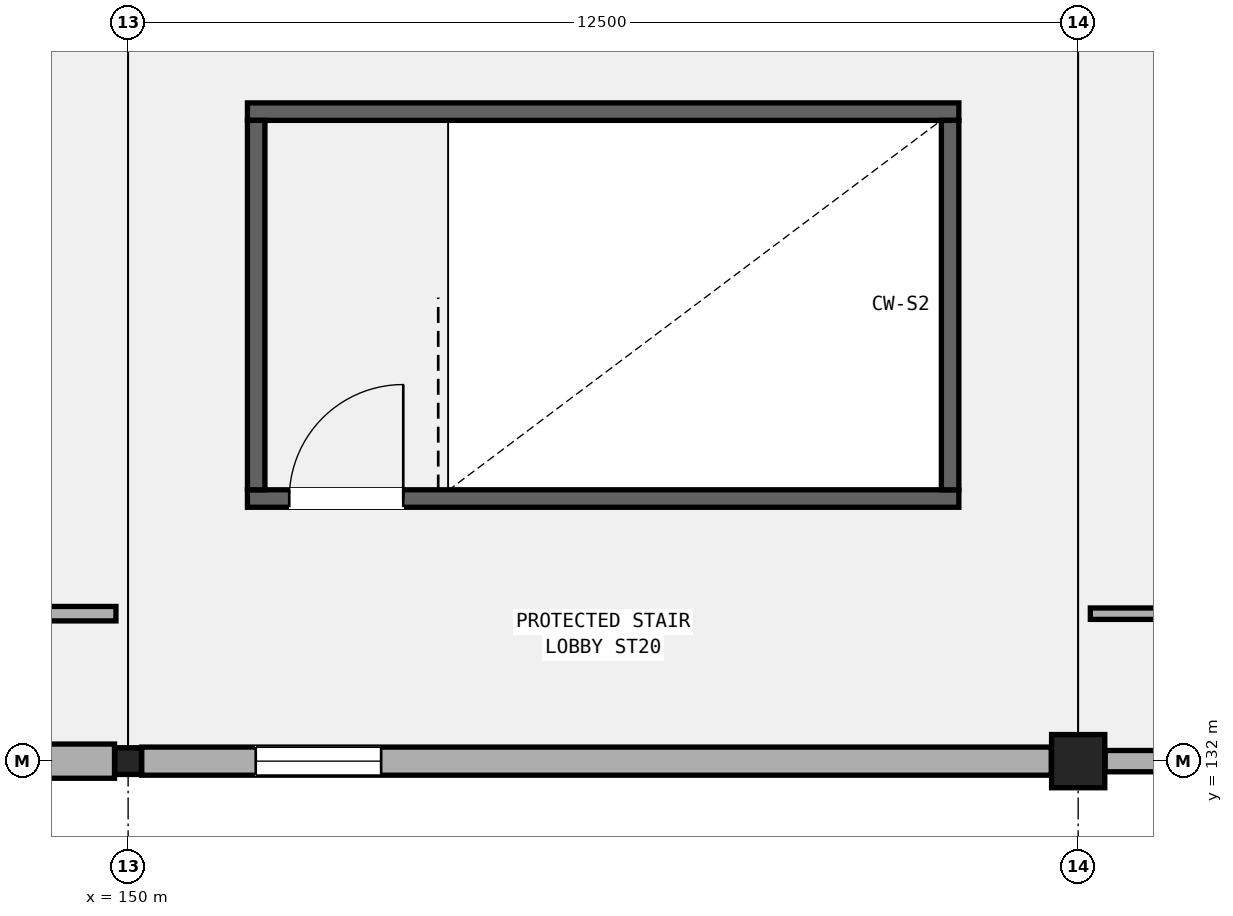
"""IFC4 building model, lengths in metres.
Left out: names, types, materials, properties, quantities, classifications, styles, units other than length and angle.
Written with IfcOpenShell. Run it as: python <this file> out.ifc"""

import sys

from ifc_helpers import new_model, si_unit, direction, frame, frame_2d, origin, origin_2d, place, context, subcontext, project, spatial, rectangle, hollow_rectangle, extrude, element, fill, save


model = new_model("IFC4")
c1 = context("Model", 3, precision=1e-05, world=origin(), true_north=direction((0.0, 1.0)))
c2 = subcontext(c1, "Body", "Model", "MODEL_VIEW")
j1 = project(units=[si_unit("LENGTHUNIT", "METRE"), si_unit("PLANEANGLEUNIT", "RADIAN")], contexts=[c1])
p1 = place(None, origin())
s1 = spatial("IfcSite", under=j1, at=p1, CompositionType="ELEMENT")
p2 = place(p1, origin())
s2 = spatial("IfcBuilding", under=s1, at=p2, CompositionType="ELEMENT")
p3 = place(p2, frame((0.0, 0.0, 20.4)))
s3 = spatial("IfcBuildingStorey", under=s2, at=p3, CompositionType="ELEMENT", Elevation=20.4)
p4 = place(p3, frame((150.0, 132.0, 0.0), z_axis=(0.0, 0.0, 1.0), x_axis=(1.0, 0.0, 0.0)))
e1 = element("IfcColumn", 1, at=p4, inside=s3, PredefinedType="COLUMN", context=c2, shape_type="SweptSolid", body=[
    extrude(hollow_rectangle(XDim=0.35, YDim=0.35, WallThickness=0.016, InnerFilletRadius=0.016, OuterFilletRadius=0.032, at=origin_2d()), origin(), (0.0, 0.0, 1.0), 5.4),
])
p5 = place(p3, frame((162.5, 132.0, 0.0), z_axis=(0.0, 0.0, 1.0), x_axis=(1.0, 0.0, 0.0)))
e2 = element("IfcColumn", 2, at=p5, inside=s3, PredefinedType="COLUMN", context=c2, shape_type="SweptSolid", body=[
    extrude(rectangle(XDim=0.7, YDim=0.7, at=origin_2d()), origin(), (0.0, 0.0, 1.0), 5.4),
])
p6 = place(p3, frame((137.704, 132.0, 0.0), z_axis=(0.0, 0.0, 1.0), x_axis=(1.0, 0.0, 0.0)))
e3 = element("IfcWall", 3, at=p6, inside=s3, PredefinedType="SOLIDWALL", context=c2, shape_type="SweptSolid", body=[
    extrude(rectangle(XDim=12.117, YDim=0.45, at=frame_2d((6.059, 0.0))), origin(), (0.0, 0.0, 1.0), 4.58),
])
p7 = place(p6, frame((1.5, 0.0, 0.95)))
e4 = element("IfcOpeningElement", 4, at=p7, cuts=e3, PredefinedType="OPENING", context=c2, shape_type="SweptSolid", body=[
    extrude(rectangle(XDim=1.5, YDim=2.25, at=frame_2d((0.75, 1.125))), frame((0.0, 0.235, 0.0), z_axis=(0.0, -1.0, 0.0), x_axis=(1.0, 0.0, 0.0)), (0.0, 0.0, 1.0), 0.47),
])
p8 = place(p3, frame((150.179, 132.0, 0.0), z_axis=(0.0, 0.0, 1.0), x_axis=(1.0, 0.0, 0.0)))
e5 = element("IfcWall", 5, at=p8, inside=s3, PredefinedType="SOLIDWALL", context=c2, shape_type="SweptSolid", body=[
    extrude(rectangle(XDim=11.967, YDim=0.37, at=frame_2d((5.983, 0.0))), origin(), (0.0, 0.0, 1.0), 4.592),
])
p9 = place(p8, frame((1.5, 0.0, 0.95)))
e6 = element("IfcOpeningElement", 6, at=p9, cuts=e5, PredefinedType="OPENING", context=c2, shape_type="SweptSolid", body=[
    extrude(rectangle(XDim=1.65, YDim=2.45, at=frame_2d((0.825, 1.225))), frame((0.0, 0.195, 0.0), z_axis=(0.0, -1.0, 0.0), x_axis=(1.0, 0.0, 0.0)), (0.0, 0.0, 1.0), 0.39),
])
p10 = place(p3, frame((162.854, 132.0, 0.0), z_axis=(0.0, 0.0, 1.0), x_axis=(1.0, 0.0, 0.0)))
e7 = element("IfcWall", 7, at=p10, inside=s3, PredefinedType="SOLIDWALL", context=c2, shape_type="SweptSolid", body=[
    extrude(rectangle(XDim=11.842, YDim=0.28, at=frame_2d((5.921, 0.0))), origin(), (0.0, 0.0, 1.0), 4.48),
])
p11 = place(p10, frame((1.5, 0.0, 0.95)))
e8 = element("IfcOpeningElement", 8, at=p11, cuts=e7, PredefinedType="OPENING", context=c2, shape_type="SweptSolid", body=[
    extrude(rectangle(XDim=1.8, YDim=2.55, at=frame_2d((0.9, 1.275))), frame((0.0, 0.15, 0.0), z_axis=(0.0, -1.0, 0.0), x_axis=(1.0, 0.0, 0.0)), (0.0, 0.0, 1.0), 0.3),
])
p12 = place(p3, frame((151.57, 135.455, 0.0), z_axis=(0.0, 0.0, 1.0), x_axis=(1.0, 0.0, 0.0)))
e9 = element("IfcWall", 9, at=p12, inside=s3, PredefinedType="SHEAR", context=c2, shape_type="SweptSolid", body=[
    extrude(rectangle(XDim=9.36, YDim=0.23, at=frame_2d((4.68, 0.0))), origin(), (0.0, 0.0, 1.0), 5.18),
])
p13 = place(p12, frame((0.55, 0.0, 0.0)))
e10 = element("IfcOpeningElement", 10, at=p13, cuts=e9, PredefinedType="OPENING", context=c2, shape_type="SweptSolid", body=[
    extrude(rectangle(XDim=1.5, YDim=2.2, at=frame_2d((0.75, 1.1))), frame((0.0, 0.125, 0.0), z_axis=(0.0, -1.0, 0.0), x_axis=(1.0, 0.0, 0.0)), (0.0, 0.0, 1.0), 0.25),
])
p14 = place(p3, frame((151.57, 140.545, 0.0), z_axis=(0.0, 0.0, 1.0), x_axis=(1.0, 0.0, 0.0)))
e11 = element("IfcWall", 11, at=p14, inside=s3, PredefinedType="SHEAR", context=c2, shape_type="SweptSolid", body=[
    extrude(rectangle(XDim=9.36, YDim=0.23, at=frame_2d((4.68, 0.0))), origin(), (0.0, 0.0, 1.0), 5.18),
])
for number, where, z_axis, x_axis in (
    (12, (151.685, 135.57, 0.0), (0.0, 0.0, 1.0), (0.0, 1.0, 0.0)),
    (13, (160.815, 135.57, 0.0), (0.0, 0.0, 1.0), (0.0, 1.0, 0.0)),
):
    element("IfcWall", number, at=place(p3, frame(where, z_axis=z_axis, x_axis=x_axis)), inside=s3, PredefinedType="SHEAR", context=c2, shape_type="SweptSolid", body=[
        extrude(rectangle(XDim=4.86, YDim=0.23, at=frame_2d((2.43, 0.0))), origin(), (0.0, 0.0, 1.0), 5.18),
    ])
p15 = place(p3, frame((137.66, 133.94, 0.0), z_axis=(0.0, 0.0, 1.0), x_axis=(1.0, 0.0, 0.0)))
e14 = element("IfcWall", 14, at=p15, inside=s3, PredefinedType="PARTITIONING", context=c2, shape_type="SweptSolid", body=[
    extrude(rectangle(XDim=12.18, YDim=0.19, at=frame_2d((6.09, 0.0))), origin(), (0.0, 0.0, 1.0), 4.52),
])
p16 = place(p15, frame((2.461, 0.0, 0.0)))
e15 = element("IfcOpeningElement", 15, at=p16, cuts=e14, PredefinedType="OPENING", context=c2, shape_type="SweptSolid", body=[
    extrude(rectangle(XDim=1.21, YDim=2.18, at=frame_2d((0.605, 1.09))), frame((0.0, 0.105, 0.0), z_axis=(0.0, -1.0, 0.0), x_axis=(1.0, 0.0, 0.0)), (0.0, 0.0, 1.0), 0.21),
])
p17 = place(p15, frame((8.616, 0.0, 0.0)))
e16 = element("IfcOpeningElement", 16, at=p17, cuts=e14, PredefinedType="OPENING", context=c2, shape_type="SweptSolid", body=[
    extrude(rectangle(XDim=1.24, YDim=2.22, at=frame_2d((0.62, 1.11))), frame((0.0, 0.105, 0.0), z_axis=(0.0, -1.0, 0.0), x_axis=(1.0, 0.0, 0.0)), (0.0, 0.0, 1.0), 0.21),
])
p18 = place(p3, frame((162.66, 133.94, 0.0), z_axis=(0.0, 0.0, 1.0), x_axis=(1.0, 0.0, 0.0)))
e17 = element("IfcWall", 17, at=p18, inside=s3, PredefinedType="PARTITIONING", context=c2, shape_type="SweptSolid", body=[
    extrude(rectangle(XDim=12.18, YDim=0.15, at=frame_2d((6.09, 0.0))), origin(), (0.0, 0.0, 1.0), 4.52),
])
p19 = place(p18, frame((5.37, 0.0, 0.0)))
e18 = element("IfcOpeningElement", 18, at=p19, cuts=e17, PredefinedType="OPENING", context=c2, shape_type="SweptSolid", body=[
    extrude(rectangle(XDim=1.44, YDim=2.26, at=frame_2d((0.72, 1.13))), frame((0.0, 0.085, 0.0), z_axis=(0.0, -1.0, 0.0), x_axis=(1.0, 0.0, 0.0)), (0.0, 0.0, 1.0), 0.17),
])
p20 = place(p9, origin())
e19 = element("IfcWindow", 19, at=p20, inside=s3, PartitioningType="SINGLE_PANEL", PredefinedType="WINDOW", context=c2, shape_type="SweptSolid", body=[
    extrude(rectangle(XDim=1.65, YDim=2.45, at=frame_2d((0.825, 1.225))), frame((0.0, 0.03, 0.0), z_axis=(0.0, -1.0, 0.0), x_axis=(1.0, 0.0, 0.0)), (0.0, 0.0, 1.0), 0.06),
])
fill(e6, e19)
p21 = place(p13, origin())
e20 = element("IfcDoor", 20, at=p21, inside=s3, OperationType="SINGLE_SWING_RIGHT", PredefinedType="DOOR", context=c2, shape_type="SweptSolid", body=[
    extrude(rectangle(XDim=1.5, YDim=2.2, at=frame_2d((0.75, 1.1))), frame((0.0, 0.025, 0.0), z_axis=(0.0, -1.0, 0.0), x_axis=(1.0, 0.0, 0.0)), (0.0, 0.0, 1.0), 0.05),
])
fill(e10, e20)
save(model, sys.argv[1])
